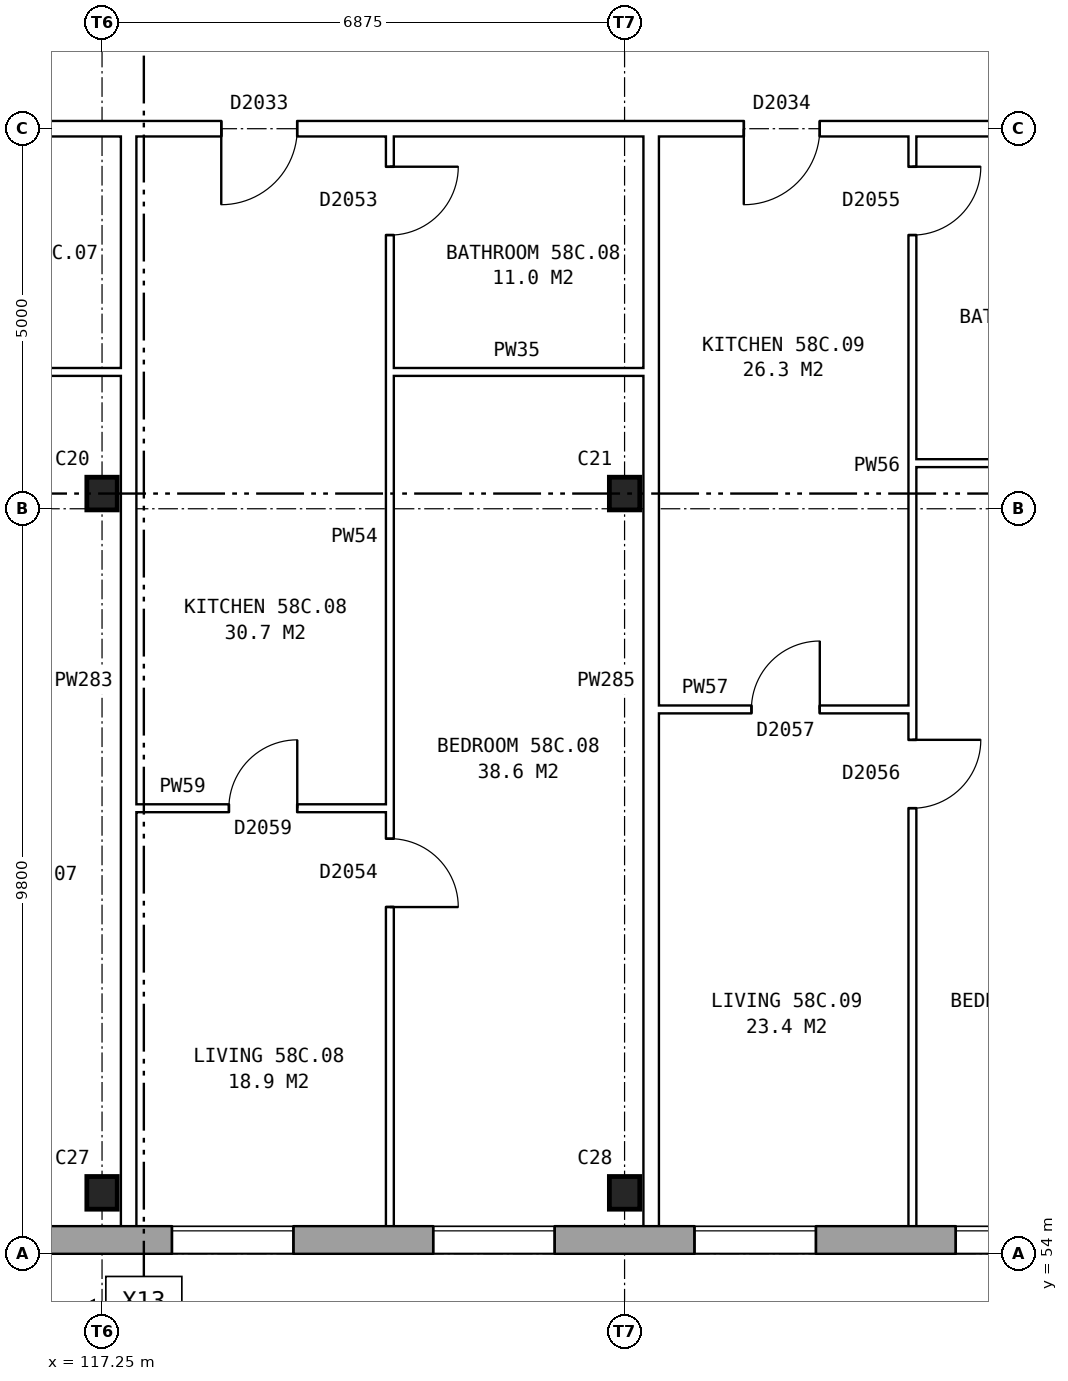
"""IFC4 building model, lengths in metres.
Left out: names, types, materials, properties, quantities, classifications, styles, units other than length and angle.
Written with IfcOpenShell. Run it as: python <this file> out.ifc"""

import sys

from ifc_helpers import new_model, si_unit, direction, frame, frame_2d, origin, origin_2d, place, context, subcontext, project, spatial, rectangle, i_section, extrude, element, fill, save


model = new_model("IFC4")
c1 = context("Model", 3, precision=1e-05, world=origin(), true_north=direction((0.0, 1.0)))
c2 = subcontext(c1, "Body", "Model", "MODEL_VIEW")
j1 = project(units=[si_unit("LENGTHUNIT", "METRE"), si_unit("PLANEANGLEUNIT", "RADIAN")], contexts=[c1])
p1 = place(None, origin())
s1 = spatial("IfcSite", under=j1, at=p1, CompositionType="ELEMENT")
p2 = place(p1, origin())
s2 = spatial("IfcBuilding", under=s1, at=p2, CompositionType="ELEMENT")
p3 = place(p2, frame((0.0, 0.0, 205.9)))
s3 = spatial("IfcBuildingStorey", under=s2, at=p3, CompositionType="ELEMENT", Elevation=205.9)
for number, where, z_axis, x_axis in (
    (1, (117.25, 54.8, 0.0), (0.0, 0.0, 1.0), (1.0, 0.0, 0.0)),
    (2, (124.125, 54.8, 0.0), (0.0, 0.0, 1.0), (1.0, 0.0, 0.0)),
    (3, (117.25, 64.0, 0.0), (0.0, 0.0, 1.0), (1.0, 0.0, 0.0)),
    (4, (124.125, 64.0, 0.0), (0.0, 0.0, 1.0), (1.0, 0.0, 0.0)),
):
    element("IfcColumn", number, at=place(p3, frame(where, z_axis=z_axis, x_axis=x_axis)), inside=s3, PredefinedType="COLUMN", context=c2, shape_type="SweptSolid", body=[
        extrude(i_section(OverallWidth=0.4, OverallDepth=0.43, WebThickness=0.04, FlangeThickness=0.04, at=origin_2d()), origin(), (0.0, 0.0, 1.0), 2.85),
    ])
p4 = place(p3, frame((75.95, 54.18, 0.0), z_axis=(0.0, 0.0, 1.0), x_axis=(1.0, 0.0, 0.0)))
e5 = element("IfcWall", 5, at=p4, inside=s3, PredefinedType="STANDARD", context=c2, shape_type="SweptSolid", body=[
    extrude(rectangle(XDim=55.1, YDim=0.36, at=frame_2d((27.55, 0.0))), origin(), (0.0, 0.0, 1.0), 2.85),
])
p5 = place(p4, frame((0.969, 0.0, 0.8)))
e6 = element("IfcOpeningElement", 6, at=p5, cuts=e5, PredefinedType="OPENING", context=c2, shape_type="SweptSolid", body=[
    extrude(rectangle(XDim=1.6, YDim=1.8, at=frame_2d((0.8, 0.9))), frame((0.0, 0.19, 0.0), z_axis=(0.0, -1.0, 0.0), x_axis=(1.0, 0.0, 0.0)), (0.0, 0.0, 1.0), 0.38),
])
p6 = place(p4, frame((4.406, 0.0, 0.8)))
e7 = element("IfcOpeningElement", 7, at=p6, cuts=e5, PredefinedType="OPENING", context=c2, shape_type="SweptSolid", body=[
    extrude(rectangle(XDim=1.6, YDim=1.8, at=frame_2d((0.8, 0.9))), frame((0.0, 0.19, 0.0), z_axis=(0.0, -1.0, 0.0), x_axis=(1.0, 0.0, 0.0)), (0.0, 0.0, 1.0), 0.38),
])
p7 = place(p4, frame((7.844, 0.0, 0.8)))
e8 = element("IfcOpeningElement", 8, at=p7, cuts=e5, PredefinedType="OPENING", context=c2, shape_type="SweptSolid", body=[
    extrude(rectangle(XDim=1.6, YDim=1.8, at=frame_2d((0.8, 0.9))), frame((0.0, 0.19, 0.0), z_axis=(0.0, -1.0, 0.0), x_axis=(1.0, 0.0, 0.0)), (0.0, 0.0, 1.0), 0.38),
])
p8 = place(p4, frame((11.281, 0.0, 0.8)))
e9 = element("IfcOpeningElement", 9, at=p8, cuts=e5, PredefinedType="OPENING", context=c2, shape_type="SweptSolid", body=[
    extrude(rectangle(XDim=1.6, YDim=1.8, at=frame_2d((0.8, 0.9))), frame((0.0, 0.19, 0.0), z_axis=(0.0, -1.0, 0.0), x_axis=(1.0, 0.0, 0.0)), (0.0, 0.0, 1.0), 0.38),
])
p9 = place(p4, frame((14.719, 0.0, 0.8)))
e10 = element("IfcOpeningElement", 10, at=p9, cuts=e5, PredefinedType="OPENING", context=c2, shape_type="SweptSolid", body=[
    extrude(rectangle(XDim=1.6, YDim=1.8, at=frame_2d((0.8, 0.9))), frame((0.0, 0.19, 0.0), z_axis=(0.0, -1.0, 0.0), x_axis=(1.0, 0.0, 0.0)), (0.0, 0.0, 1.0), 0.38),
])
p10 = place(p4, frame((18.156, 0.0, 0.8)))
e11 = element("IfcOpeningElement", 11, at=p10, cuts=e5, PredefinedType="OPENING", context=c2, shape_type="SweptSolid", body=[
    extrude(rectangle(XDim=1.6, YDim=1.8, at=frame_2d((0.8, 0.9))), frame((0.0, 0.19, 0.0), z_axis=(0.0, -1.0, 0.0), x_axis=(1.0, 0.0, 0.0)), (0.0, 0.0, 1.0), 0.38),
])
p11 = place(p4, frame((21.594, 0.0, 0.8)))
e12 = element("IfcOpeningElement", 12, at=p11, cuts=e5, PredefinedType="OPENING", context=c2, shape_type="SweptSolid", body=[
    extrude(rectangle(XDim=1.6, YDim=1.8, at=frame_2d((0.8, 0.9))), frame((0.0, 0.19, 0.0), z_axis=(0.0, -1.0, 0.0), x_axis=(1.0, 0.0, 0.0)), (0.0, 0.0, 1.0), 0.38),
])
p12 = place(p4, frame((25.031, 0.0, 0.8)))
e13 = element("IfcOpeningElement", 13, at=p12, cuts=e5, PredefinedType="OPENING", context=c2, shape_type="SweptSolid", body=[
    extrude(rectangle(XDim=1.6, YDim=1.8, at=frame_2d((0.8, 0.9))), frame((0.0, 0.19, 0.0), z_axis=(0.0, -1.0, 0.0), x_axis=(1.0, 0.0, 0.0)), (0.0, 0.0, 1.0), 0.38),
])
p13 = place(p4, frame((28.469, 0.0, 0.8)))
e14 = element("IfcOpeningElement", 14, at=p13, cuts=e5, PredefinedType="OPENING", context=c2, shape_type="SweptSolid", body=[
    extrude(rectangle(XDim=1.6, YDim=1.8, at=frame_2d((0.8, 0.9))), frame((0.0, 0.19, 0.0), z_axis=(0.0, -1.0, 0.0), x_axis=(1.0, 0.0, 0.0)), (0.0, 0.0, 1.0), 0.38),
])
p14 = place(p4, frame((31.906, 0.0, 0.8)))
e15 = element("IfcOpeningElement", 15, at=p14, cuts=e5, PredefinedType="OPENING", context=c2, shape_type="SweptSolid", body=[
    extrude(rectangle(XDim=1.6, YDim=1.8, at=frame_2d((0.8, 0.9))), frame((0.0, 0.19, 0.0), z_axis=(0.0, -1.0, 0.0), x_axis=(1.0, 0.0, 0.0)), (0.0, 0.0, 1.0), 0.38),
])
p15 = place(p4, frame((35.344, 0.0, 0.8)))
e16 = element("IfcOpeningElement", 16, at=p15, cuts=e5, PredefinedType="OPENING", context=c2, shape_type="SweptSolid", body=[
    extrude(rectangle(XDim=1.6, YDim=1.8, at=frame_2d((0.8, 0.9))), frame((0.0, 0.19, 0.0), z_axis=(0.0, -1.0, 0.0), x_axis=(1.0, 0.0, 0.0)), (0.0, 0.0, 1.0), 0.38),
])
p16 = place(p4, frame((38.781, 0.0, 0.8)))
e17 = element("IfcOpeningElement", 17, at=p16, cuts=e5, PredefinedType="OPENING", context=c2, shape_type="SweptSolid", body=[
    extrude(rectangle(XDim=1.6, YDim=1.8, at=frame_2d((0.8, 0.9))), frame((0.0, 0.19, 0.0), z_axis=(0.0, -1.0, 0.0), x_axis=(1.0, 0.0, 0.0)), (0.0, 0.0, 1.0), 0.38),
])
p17 = place(p4, frame((42.219, 0.0, 0.8)))
e18 = element("IfcOpeningElement", 18, at=p17, cuts=e5, PredefinedType="OPENING", context=c2, shape_type="SweptSolid", body=[
    extrude(rectangle(XDim=1.6, YDim=1.8, at=frame_2d((0.8, 0.9))), frame((0.0, 0.19, 0.0), z_axis=(0.0, -1.0, 0.0), x_axis=(1.0, 0.0, 0.0)), (0.0, 0.0, 1.0), 0.38),
])
p18 = place(p4, frame((45.656, 0.0, 0.8)))
e19 = element("IfcOpeningElement", 19, at=p18, cuts=e5, PredefinedType="OPENING", context=c2, shape_type="SweptSolid", body=[
    extrude(rectangle(XDim=1.6, YDim=1.8, at=frame_2d((0.8, 0.9))), frame((0.0, 0.19, 0.0), z_axis=(0.0, -1.0, 0.0), x_axis=(1.0, 0.0, 0.0)), (0.0, 0.0, 1.0), 0.38),
])
p19 = place(p4, frame((49.094, 0.0, 0.8)))
e20 = element("IfcOpeningElement", 20, at=p19, cuts=e5, PredefinedType="OPENING", context=c2, shape_type="SweptSolid", body=[
    extrude(rectangle(XDim=1.6, YDim=1.8, at=frame_2d((0.8, 0.9))), frame((0.0, 0.19, 0.0), z_axis=(0.0, -1.0, 0.0), x_axis=(1.0, 0.0, 0.0)), (0.0, 0.0, 1.0), 0.38),
])
p20 = place(p4, frame((52.531, 0.0, 0.8)))
e21 = element("IfcOpeningElement", 21, at=p20, cuts=e5, PredefinedType="OPENING", context=c2, shape_type="SweptSolid", body=[
    extrude(rectangle(XDim=1.6, YDim=1.8, at=frame_2d((0.8, 0.9))), frame((0.0, 0.19, 0.0), z_axis=(0.0, -1.0, 0.0), x_axis=(1.0, 0.0, 0.0)), (0.0, 0.0, 1.0), 0.38),
])
p21 = place(p3, frame((117.7, 59.86, 0.0), z_axis=(0.0, 0.0, 1.0), x_axis=(1.0, 0.0, 0.0)))
e22 = element("IfcWall", 22, at=p21, inside=s3, PredefinedType="PARTITIONING", context=c2, shape_type="SweptSolid", body=[
    extrude(rectangle(XDim=3.337, YDim=0.1, at=frame_2d((1.668, 0.0))), origin(), (0.0, 0.0, 1.0), 2.85),
])
p22 = place(p21, frame((1.219, 0.0, 0.0)))
e23 = element("IfcOpeningElement", 23, at=p22, cuts=e22, PredefinedType="OPENING", context=c2, shape_type="SweptSolid", body=[
    extrude(rectangle(XDim=0.9, YDim=2.1, at=frame_2d((0.45, 1.05))), frame((0.0, 0.06, 0.0), z_axis=(0.0, -1.0, 0.0), x_axis=(1.0, 0.0, 0.0)), (0.0, 0.0, 1.0), 0.12),
])
p23 = place(p3, frame((124.575, 61.16, 0.0), z_axis=(0.0, 0.0, 1.0), x_axis=(1.0, 0.0, 0.0)))
e24 = element("IfcWall", 24, at=p23, inside=s3, PredefinedType="PARTITIONING", context=c2, shape_type="SweptSolid", body=[
    extrude(rectangle(XDim=3.337, YDim=0.1, at=frame_2d((1.668, 0.0))), origin(), (0.0, 0.0, 1.0), 2.85),
])
p24 = place(p23, frame((1.219, 0.0, 0.0)))
e25 = element("IfcOpeningElement", 25, at=p24, cuts=e24, PredefinedType="OPENING", context=c2, shape_type="SweptSolid", body=[
    extrude(rectangle(XDim=0.9, YDim=2.1, at=frame_2d((0.45, 1.05))), frame((0.0, 0.06, 0.0), z_axis=(0.0, -1.0, 0.0), x_axis=(1.0, 0.0, 0.0)), (0.0, 0.0, 1.0), 0.12),
])
p25 = place(p3, frame((127.912, 64.4, 0.0), z_axis=(0.0, 0.0, 1.0), x_axis=(1.0, 0.0, 0.0)))
e26 = element("IfcWall", 26, at=p25, inside=s3, PredefinedType="PARTITIONING", context=c2, shape_type="SweptSolid", body=[
    extrude(rectangle(XDim=3.448, YDim=0.1, at=frame_2d((1.724, 0.0))), origin(), (0.0, 0.0, 1.0), 2.85),
])
for number, where, z_axis, x_axis in (
    (27, (114.162, 65.6, 0.0), (0.0, 0.0, 1.0), (1.0, 0.0, 0.0)),
    (28, (121.037, 65.6, 0.0), (0.0, 0.0, 1.0), (1.0, 0.0, 0.0)),
):
    element("IfcWall", number, at=place(p3, frame(where, z_axis=z_axis, x_axis=x_axis)), inside=s3, PredefinedType="PARTITIONING", context=c2, shape_type="SweptSolid", body=[
        extrude(rectangle(XDim=3.338, YDim=0.1, at=frame_2d((1.669, 0.0))), origin(), (0.0, 0.0, 1.0), 2.85),
    ])
p26 = place(p3, frame((75.64, 68.8, 0.0), z_axis=(0.0, 0.0, 1.0), x_axis=(1.0, 0.0, 0.0)))
e29 = element("IfcWall", 29, at=p26, inside=s3, PredefinedType="PARTITIONING", context=c2, shape_type="SweptSolid", body=[
    extrude(rectangle(XDim=55.72, YDim=0.2, at=frame_2d((27.86, 0.0))), origin(), (0.0, 0.0, 1.0), 2.85),
])
p27 = place(p26, frame((5.191, 0.0, 0.0)))
e30 = element("IfcOpeningElement", 30, at=p27, cuts=e29, PredefinedType="OPENING", context=c2, shape_type="SweptSolid", body=[
    extrude(rectangle(XDim=1.0, YDim=2.1, at=frame_2d((0.5, 1.05))), frame((0.0, 0.11, 0.0), z_axis=(0.0, -1.0, 0.0), x_axis=(1.0, 0.0, 0.0)), (0.0, 0.0, 1.0), 0.22),
])
p28 = place(p26, frame((12.241, 0.0, 0.0)))
e31 = element("IfcOpeningElement", 31, at=p28, cuts=e29, PredefinedType="OPENING", context=c2, shape_type="SweptSolid", body=[
    extrude(rectangle(XDim=1.0, YDim=2.1, at=frame_2d((0.5, 1.05))), frame((0.0, 0.11, 0.0), z_axis=(0.0, -1.0, 0.0), x_axis=(1.0, 0.0, 0.0)), (0.0, 0.0, 1.0), 0.22),
])
p29 = place(p26, frame((22.553, 0.0, 0.0)))
e32 = element("IfcOpeningElement", 32, at=p29, cuts=e29, PredefinedType="OPENING", context=c2, shape_type="SweptSolid", body=[
    extrude(rectangle(XDim=1.0, YDim=2.1, at=frame_2d((0.5, 1.05))), frame((0.0, 0.11, 0.0), z_axis=(0.0, -1.0, 0.0), x_axis=(1.0, 0.0, 0.0)), (0.0, 0.0, 1.0), 0.22),
])
p30 = place(p26, frame((32.866, 0.0, 0.0)))
e33 = element("IfcOpeningElement", 33, at=p30, cuts=e29, PredefinedType="OPENING", context=c2, shape_type="SweptSolid", body=[
    extrude(rectangle(XDim=1.0, YDim=2.1, at=frame_2d((0.5, 1.05))), frame((0.0, 0.11, 0.0), z_axis=(0.0, -1.0, 0.0), x_axis=(1.0, 0.0, 0.0)), (0.0, 0.0, 1.0), 0.22),
])
p31 = place(p26, frame((36.303, 0.0, 0.0)))
e34 = element("IfcOpeningElement", 34, at=p31, cuts=e29, PredefinedType="OPENING", context=c2, shape_type="SweptSolid", body=[
    extrude(rectangle(XDim=1.0, YDim=2.1, at=frame_2d((0.5, 1.05))), frame((0.0, 0.11, 0.0), z_axis=(0.0, -1.0, 0.0), x_axis=(1.0, 0.0, 0.0)), (0.0, 0.0, 1.0), 0.22),
])
p32 = place(p26, frame((43.178, 0.0, 0.0)))
e35 = element("IfcOpeningElement", 35, at=p32, cuts=e29, PredefinedType="OPENING", context=c2, shape_type="SweptSolid", body=[
    extrude(rectangle(XDim=1.0, YDim=2.1, at=frame_2d((0.5, 1.05))), frame((0.0, 0.11, 0.0), z_axis=(0.0, -1.0, 0.0), x_axis=(1.0, 0.0, 0.0)), (0.0, 0.0, 1.0), 0.22),
])
p33 = place(p26, frame((50.053, 0.0, 0.0)))
e36 = element("IfcOpeningElement", 36, at=p33, cuts=e29, PredefinedType="OPENING", context=c2, shape_type="SweptSolid", body=[
    extrude(rectangle(XDim=1.0, YDim=2.1, at=frame_2d((0.5, 1.05))), frame((0.0, 0.11, 0.0), z_axis=(0.0, -1.0, 0.0), x_axis=(1.0, 0.0, 0.0)), (0.0, 0.0, 1.0), 0.22),
])
p34 = place(p3, frame((117.6, 54.36, 0.0), z_axis=(0.0, 0.0, 1.0), x_axis=(0.0, 1.0, 0.0)))
e37 = element("IfcWall", 37, at=p34, inside=s3, PredefinedType="PARTITIONING", context=c2, shape_type="SweptSolid", body=[
    extrude(rectangle(XDim=14.34, YDim=0.2, at=frame_2d((7.17, 0.0))), origin(), (0.0, 0.0, 1.0), 2.85),
])
p35 = place(p3, frame((121.037, 54.36, 0.0), z_axis=(0.0, 0.0, 1.0), x_axis=(0.0, 1.0, 0.0)))
e38 = element("IfcWall", 38, at=p35, inside=s3, PredefinedType="PARTITIONING", context=c2, shape_type="SweptSolid", body=[
    extrude(rectangle(XDim=14.34, YDim=0.1, at=frame_2d((7.17, 0.0))), origin(), (0.0, 0.0, 1.0), 2.85),
])
p36 = place(p35, frame((4.2, 0.0, 0.0)))
e39 = element("IfcOpeningElement", 39, at=p36, cuts=e38, PredefinedType="OPENING", context=c2, shape_type="SweptSolid", body=[
    extrude(rectangle(XDim=0.9, YDim=2.1, at=frame_2d((0.45, 1.05))), frame((0.0, 0.06, 0.0), z_axis=(0.0, -1.0, 0.0), x_axis=(1.0, 0.0, 0.0)), (0.0, 0.0, 1.0), 0.12),
])
p37 = place(p35, frame((13.04, 0.0, 0.0)))
e40 = element("IfcOpeningElement", 40, at=p37, cuts=e38, PredefinedType="OPENING", context=c2, shape_type="SweptSolid", body=[
    extrude(rectangle(XDim=0.9, YDim=2.1, at=frame_2d((0.45, 1.05))), frame((0.0, 0.06, 0.0), z_axis=(0.0, -1.0, 0.0), x_axis=(1.0, 0.0, 0.0)), (0.0, 0.0, 1.0), 0.12),
])
p38 = place(p3, frame((124.475, 54.36, 0.0), z_axis=(0.0, 0.0, 1.0), x_axis=(0.0, 1.0, 0.0)))
e41 = element("IfcWall", 41, at=p38, inside=s3, PredefinedType="PARTITIONING", context=c2, shape_type="SweptSolid", body=[
    extrude(rectangle(XDim=14.34, YDim=0.2, at=frame_2d((7.17, 0.0))), origin(), (0.0, 0.0, 1.0), 2.85),
])
p39 = place(p3, frame((127.912, 54.36, 0.0), z_axis=(0.0, 0.0, 1.0), x_axis=(0.0, 1.0, 0.0)))
e42 = element("IfcWall", 42, at=p39, inside=s3, PredefinedType="PARTITIONING", context=c2, shape_type="SweptSolid", body=[
    extrude(rectangle(XDim=14.34, YDim=0.1, at=frame_2d((7.17, 0.0))), origin(), (0.0, 0.0, 1.0), 2.85),
])
p40 = place(p39, frame((5.5, 0.0, 0.0)))
e43 = element("IfcOpeningElement", 43, at=p40, cuts=e42, PredefinedType="OPENING", context=c2, shape_type="SweptSolid", body=[
    extrude(rectangle(XDim=0.9, YDim=2.1, at=frame_2d((0.45, 1.05))), frame((0.0, 0.06, 0.0), z_axis=(0.0, -1.0, 0.0), x_axis=(1.0, 0.0, 0.0)), (0.0, 0.0, 1.0), 0.12),
])
p41 = place(p39, frame((13.04, 0.0, 0.0)))
e44 = element("IfcOpeningElement", 44, at=p41, cuts=e42, PredefinedType="OPENING", context=c2, shape_type="SweptSolid", body=[
    extrude(rectangle(XDim=0.9, YDim=2.1, at=frame_2d((0.45, 1.05))), frame((0.0, 0.06, 0.0), z_axis=(0.0, -1.0, 0.0), x_axis=(1.0, 0.0, 0.0)), (0.0, 0.0, 1.0), 0.12),
])
p42 = place(p17, origin())
e45 = element("IfcWindow", 45, at=p42, inside=s3, PartitioningType="SINGLE_PANEL", PredefinedType="WINDOW", context=c2, shape_type="SweptSolid", body=[
    extrude(rectangle(XDim=1.6, YDim=1.8, at=frame_2d((0.8, 0.9))), frame((0.0, 0.15, 0.0), z_axis=(0.0, -1.0, 0.0), x_axis=(1.0, 0.0, 0.0)), (0.0, 0.0, 1.0), 0.06),
])
fill(e18, e45)
p43 = place(p18, origin())
e46 = element("IfcWindow", 46, at=p43, inside=s3, PartitioningType="SINGLE_PANEL", PredefinedType="WINDOW", context=c2, shape_type="SweptSolid", body=[
    extrude(rectangle(XDim=1.6, YDim=1.8, at=frame_2d((0.8, 0.9))), frame((0.0, 0.15, 0.0), z_axis=(0.0, -1.0, 0.0), x_axis=(1.0, 0.0, 0.0)), (0.0, 0.0, 1.0), 0.06),
])
fill(e19, e46)
p44 = place(p19, origin())
e47 = element("IfcWindow", 47, at=p44, inside=s3, PartitioningType="SINGLE_PANEL", PredefinedType="WINDOW", context=c2, shape_type="SweptSolid", body=[
    extrude(rectangle(XDim=1.6, YDim=1.8, at=frame_2d((0.8, 0.9))), frame((0.0, 0.15, 0.0), z_axis=(0.0, -1.0, 0.0), x_axis=(1.0, 0.0, 0.0)), (0.0, 0.0, 1.0), 0.06),
])
fill(e20, e47)
p45 = place(p20, origin())
e48 = element("IfcWindow", 48, at=p45, inside=s3, PartitioningType="SINGLE_PANEL", PredefinedType="WINDOW", context=c2, shape_type="SweptSolid", body=[
    extrude(rectangle(XDim=1.6, YDim=1.8, at=frame_2d((0.8, 0.9))), frame((0.0, 0.15, 0.0), z_axis=(0.0, -1.0, 0.0), x_axis=(1.0, 0.0, 0.0)), (0.0, 0.0, 1.0), 0.06),
])
fill(e21, e48)
p46 = place(p36, frame((0.9, 0.0, 0.0), z_axis=(0.0, 0.0, 1.0), x_axis=(-1.0, 0.0, 0.0)))
e49 = element("IfcDoor", 49, at=p46, inside=s3, OperationType="SINGLE_SWING_RIGHT", PredefinedType="DOOR", context=c2, shape_type="SweptSolid", body=[
    extrude(rectangle(XDim=0.9, YDim=2.1, at=frame_2d((0.45, 1.05))), frame((0.0, 0.025, 0.0), z_axis=(0.0, -1.0, 0.0), x_axis=(1.0, 0.0, 0.0)), (0.0, 0.0, 1.0), 0.05),
])
fill(e39, e49)
p47 = place(p32, frame((1.0, 0.0, 0.0), z_axis=(0.0, 0.0, 1.0), x_axis=(-1.0, 0.0, 0.0)))
e50 = element("IfcDoor", 50, at=p47, inside=s3, OperationType="SINGLE_SWING_RIGHT", PredefinedType="DOOR", context=c2, shape_type="SweptSolid", body=[
    extrude(rectangle(XDim=1.0, YDim=2.1, at=frame_2d((0.5, 1.05))), frame((0.0, 0.025, 0.0), z_axis=(0.0, -1.0, 0.0), x_axis=(1.0, 0.0, 0.0)), (0.0, 0.0, 1.0), 0.05),
])
fill(e35, e50)
p48 = place(p22, origin())
e51 = element("IfcDoor", 51, at=p48, inside=s3, OperationType="SINGLE_SWING_RIGHT", PredefinedType="DOOR", context=c2, shape_type="SweptSolid", body=[
    extrude(rectangle(XDim=0.9, YDim=2.1, at=frame_2d((0.45, 1.05))), frame((0.0, 0.025, 0.0), z_axis=(0.0, -1.0, 0.0), x_axis=(1.0, 0.0, 0.0)), (0.0, 0.0, 1.0), 0.05),
])
fill(e23, e51)
p49 = place(p37, frame((0.9, 0.0, 0.0), z_axis=(0.0, 0.0, 1.0), x_axis=(-1.0, 0.0, 0.0)))
e52 = element("IfcDoor", 52, at=p49, inside=s3, OperationType="SINGLE_SWING_LEFT", PredefinedType="DOOR", context=c2, shape_type="SweptSolid", body=[
    extrude(rectangle(XDim=0.9, YDim=2.1, at=frame_2d((0.45, 1.05))), frame((0.0, 0.025, 0.0), z_axis=(0.0, -1.0, 0.0), x_axis=(1.0, 0.0, 0.0)), (0.0, 0.0, 1.0), 0.05),
])
fill(e40, e52)
p50 = place(p40, frame((0.9, 0.0, 0.0), z_axis=(0.0, 0.0, 1.0), x_axis=(-1.0, 0.0, 0.0)))
e53 = element("IfcDoor", 53, at=p50, inside=s3, OperationType="SINGLE_SWING_LEFT", PredefinedType="DOOR", context=c2, shape_type="SweptSolid", body=[
    extrude(rectangle(XDim=0.9, YDim=2.1, at=frame_2d((0.45, 1.05))), frame((0.0, 0.025, 0.0), z_axis=(0.0, -1.0, 0.0), x_axis=(1.0, 0.0, 0.0)), (0.0, 0.0, 1.0), 0.05),
])
fill(e43, e53)
p51 = place(p33, frame((1.0, 0.0, 0.0), z_axis=(0.0, 0.0, 1.0), x_axis=(-1.0, 0.0, 0.0)))
e54 = element("IfcDoor", 54, at=p51, inside=s3, OperationType="SINGLE_SWING_RIGHT", PredefinedType="DOOR", context=c2, shape_type="SweptSolid", body=[
    extrude(rectangle(XDim=1.0, YDim=2.1, at=frame_2d((0.5, 1.05))), frame((0.0, 0.025, 0.0), z_axis=(0.0, -1.0, 0.0), x_axis=(1.0, 0.0, 0.0)), (0.0, 0.0, 1.0), 0.05),
])
fill(e36, e54)
p52 = place(p24, origin())
e55 = element("IfcDoor", 55, at=p52, inside=s3, OperationType="SINGLE_SWING_RIGHT", PredefinedType="DOOR", context=c2, shape_type="SweptSolid", body=[
    extrude(rectangle(XDim=0.9, YDim=2.1, at=frame_2d((0.45, 1.05))), frame((0.0, 0.025, 0.0), z_axis=(0.0, -1.0, 0.0), x_axis=(1.0, 0.0, 0.0)), (0.0, 0.0, 1.0), 0.05),
])
fill(e25, e55)
p53 = place(p41, frame((0.9, 0.0, 0.0), z_axis=(0.0, 0.0, 1.0), x_axis=(-1.0, 0.0, 0.0)))
e56 = element("IfcDoor", 56, at=p53, inside=s3, OperationType="SINGLE_SWING_LEFT", PredefinedType="DOOR", context=c2, shape_type="SweptSolid", body=[
    extrude(rectangle(XDim=0.9, YDim=2.1, at=frame_2d((0.45, 1.05))), frame((0.0, 0.025, 0.0), z_axis=(0.0, -1.0, 0.0), x_axis=(1.0, 0.0, 0.0)), (0.0, 0.0, 1.0), 0.05),
])
fill(e44, e56)
save(model, sys.argv[1])
